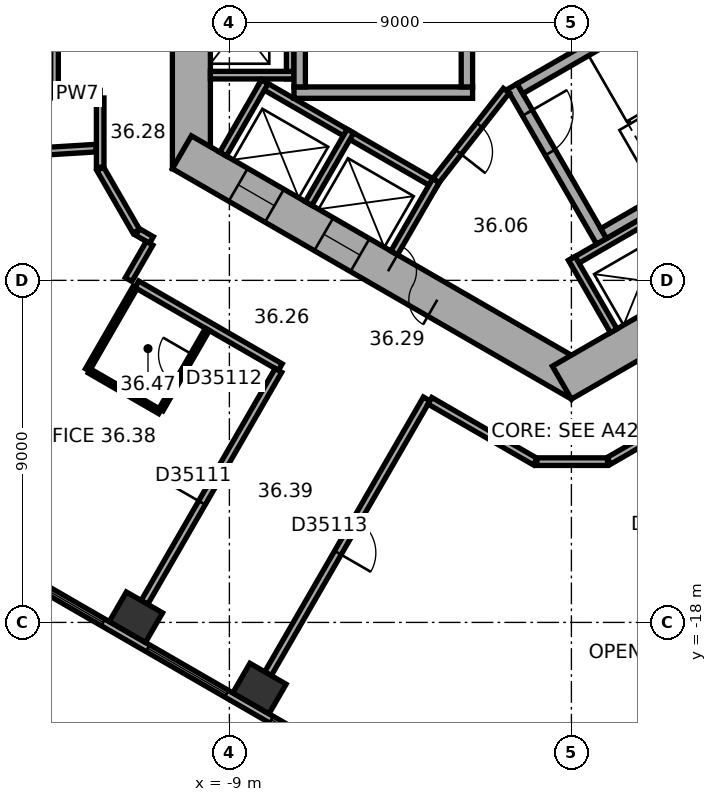
"""IFC4 building model, lengths in metres.
Left out: names, types, materials, properties, quantities, classifications, styles, units other than length and angle.
Written with IfcOpenShell. Run it as: python <this file> out.ifc"""

import sys

from ifc_helpers import new_model, si_unit, direction, frame, frame_2d, origin, origin_2d, place, context, subcontext, project, spatial, rectangle, extrude, element, fill, save


model = new_model("IFC4")
c1 = context("Model", 3, precision=1e-05, world=origin(), true_north=direction((0.0, 1.0)))
c2 = subcontext(c1, "Body", "Model", "MODEL_VIEW")
j1 = project(units=[si_unit("LENGTHUNIT", "METRE"), si_unit("PLANEANGLEUNIT", "RADIAN")], contexts=[c1])
p1 = place(None, origin())
s1 = spatial("IfcSite", under=j1, at=p1, CompositionType="ELEMENT")
p2 = place(p1, origin())
s2 = spatial("IfcBuilding", under=s1, at=p2, CompositionType="ELEMENT")
p3 = place(p2, frame((0.0, 0.0, 150.3)))
s3 = spatial("IfcBuildingStorey", under=s2, at=p3, CompositionType="ELEMENT", Elevation=150.3)
for number, where, z_axis, x_axis in (
    (1, (-11.46, -17.863, 0.0), (0.0, 0.0, 1.0), (0.866, -0.5, 0.0)),
    (2, (-8.208, -19.74, 0.0), (0.0, 0.0, 1.0), (0.866, -0.5, 0.0)),
):
    element("IfcColumn", number, at=place(p3, frame(where, z_axis=z_axis, x_axis=x_axis)), inside=s3, PredefinedType="COLUMN", context=c2, shape_type="SweptSolid", body=[
        extrude(rectangle(XDim=1.1, YDim=0.9, at=origin_2d()), origin(), (0.0, 0.0, 1.0), 3.7),
    ])
p4 = place(p3, frame((-10.0, 6.062, 0.0), z_axis=(0.0, 0.0, 1.0), x_axis=(0.0, -1.0, 0.0)))
e3 = element("IfcWall", 3, at=p4, inside=s3, PredefinedType="SHEAR", context=c2, shape_type="SweptSolid", body=[
    extrude(rectangle(XDim=12.125, YDim=1.0, at=frame_2d((6.062, 0.0))), origin(), (0.0, 0.0, 1.0), 3.7),
])
p5 = place(p4, frame((5.212, 0.0, 0.0)))
e4 = element("IfcOpeningElement", 4, at=p5, cuts=e3, PredefinedType="OPENING", context=c2, shape_type="SweptSolid", body=[
    extrude(rectangle(XDim=1.1, YDim=2.1, at=frame_2d((0.55, 1.05))), frame((0.0, 0.51, 0.0), z_axis=(0.0, -1.0, 0.0), x_axis=(1.0, 0.0, 0.0)), (0.0, 0.0, 1.0), 1.02),
])
p6 = place(p4, frame((7.812, 0.0, 0.0)))
e5 = element("IfcOpeningElement", 5, at=p6, cuts=e3, PredefinedType="OPENING", context=c2, shape_type="SweptSolid", body=[
    extrude(rectangle(XDim=1.1, YDim=2.1, at=frame_2d((0.55, 1.05))), frame((0.0, 0.51, 0.0), z_axis=(0.0, -1.0, 0.0), x_axis=(1.0, 0.0, 0.0)), (0.0, 0.0, 1.0), 1.02),
])
p7 = place(p3, frame((-10.25, -5.629, 0.0), z_axis=(0.0, 0.0, 1.0), x_axis=(0.866022616891, -0.50000482701, 0.0)))
e6 = element("IfcWall", 6, at=p7, inside=s3, PredefinedType="SHEAR", context=c2, shape_type="SweptSolid", body=[
    extrude(rectangle(XDim=12.125, YDim=1.0, at=frame_2d((6.062, 0.0))), origin(), (0.0, 0.0, 1.0), 3.7),
])
p8 = place(p7, frame((6.262, 0.0, 0.0)))
e7 = element("IfcOpeningElement", 7, at=p8, cuts=e6, PredefinedType="OPENING", context=c2, shape_type="SweptSolid", body=[
    extrude(rectangle(XDim=1.5, YDim=2.1, at=frame_2d((0.75, 1.05))), frame((0.0, 0.51, 0.0), z_axis=(0.0, -1.0, 0.0), x_axis=(1.0, 0.0, 0.0)), (0.0, 0.0, 1.0), 1.02),
])
p9 = place(p7, frame((1.712, 0.0, 0.0)))
e8 = element("IfcOpeningElement", 8, at=p9, cuts=e6, PredefinedType="OPENING", context=c2, shape_type="SweptSolid", body=[
    extrude(rectangle(XDim=1.1, YDim=2.1, at=frame_2d((0.55, 1.05))), frame((0.0, 0.51, 0.0), z_axis=(0.0, -1.0, 0.0), x_axis=(1.0, 0.0, 0.0)), (0.0, 0.0, 1.0), 1.02),
])
p10 = place(p7, frame((4.312, 0.0, 0.0)))
e9 = element("IfcOpeningElement", 9, at=p10, cuts=e6, PredefinedType="OPENING", context=c2, shape_type="SweptSolid", body=[
    extrude(rectangle(XDim=1.1, YDim=2.1, at=frame_2d((0.55, 1.05))), frame((0.0, 0.51, 0.0), z_axis=(0.0, -1.0, 0.0), x_axis=(1.0, 0.0, 0.0)), (0.0, 0.0, 1.0), 1.02),
])
p11 = place(p3, frame((-0.25, -11.691, 0.0), z_axis=(0.0, 0.0, 1.0), x_axis=(0.866022616891, 0.50000482701, 0.0)))
e10 = element("IfcWall", 10, at=p11, inside=s3, PredefinedType="SHEAR", context=c2, shape_type="SweptSolid", body=[
    extrude(rectangle(XDim=12.125, YDim=1.0, at=frame_2d((6.062, 0.0))), origin(), (0.0, 0.0, 1.0), 3.7),
])
p12 = place(p11, frame((2.612, 0.0, 0.0)))
e11 = element("IfcOpeningElement", 11, at=p12, cuts=e10, PredefinedType="OPENING", context=c2, shape_type="SweptSolid", body=[
    extrude(rectangle(XDim=1.1, YDim=2.1, at=frame_2d((0.55, 1.05))), frame((0.0, 0.51, 0.0), z_axis=(0.0, -1.0, 0.0), x_axis=(1.0, 0.0, 0.0)), (0.0, 0.0, 1.0), 1.02),
])
p13 = place(p11, frame((5.212, 0.0, 0.0)))
e12 = element("IfcOpeningElement", 12, at=p13, cuts=e10, PredefinedType="OPENING", context=c2, shape_type="SweptSolid", body=[
    extrude(rectangle(XDim=1.1, YDim=2.1, at=frame_2d((0.55, 1.05))), frame((0.0, 0.51, 0.0), z_axis=(0.0, -1.0, 0.0), x_axis=(1.0, 0.0, 0.0)), (0.0, 0.0, 1.0), 1.02),
])
p14 = place(p11, frame((7.812, 0.0, 0.0)))
e13 = element("IfcOpeningElement", 13, at=p14, cuts=e10, PredefinedType="OPENING", context=c2, shape_type="SweptSolid", body=[
    extrude(rectangle(XDim=1.1, YDim=2.1, at=frame_2d((0.55, 1.05))), frame((0.0, 0.51, 0.0), z_axis=(0.0, -1.0, 0.0), x_axis=(1.0, 0.0, 0.0)), (0.0, 0.0, 1.0), 1.02),
])
p15 = place(p3, frame((-18.789, -14.267, 0.0), z_axis=(0.0, 0.0, 1.0), x_axis=(0.866023315909, -0.500003616288, 0.0)))
e14 = element("IfcWall", 14, at=p15, inside=s3, PredefinedType="STANDARD", context=c2, shape_type="SweptSolid", body=[
    extrude(rectangle(XDim=20.044, YDim=0.2, at=frame_2d((10.022, 0.0))), origin(), (0.0, 0.0, 1.0), 3.7),
])
p16 = place(p15, frame((1.314, 0.0, 0.9)))
e15 = element("IfcOpeningElement", 15, at=p16, cuts=e14, PredefinedType="OPENING", context=c2, shape_type="SweptSolid", body=[
    extrude(rectangle(XDim=2.4, YDim=2.0, at=frame_2d((1.2, 1.0))), frame((0.0, 0.11, 0.0), z_axis=(0.0, -1.0, 0.0), x_axis=(1.0, 0.0, 0.0)), (0.0, 0.0, 1.0), 0.22),
])
p17 = place(p15, frame((5.069, 0.0, 0.9)))
e16 = element("IfcOpeningElement", 16, at=p17, cuts=e14, PredefinedType="OPENING", context=c2, shape_type="SweptSolid", body=[
    extrude(rectangle(XDim=2.4, YDim=2.0, at=frame_2d((1.2, 1.0))), frame((0.0, 0.11, 0.0), z_axis=(0.0, -1.0, 0.0), x_axis=(1.0, 0.0, 0.0)), (0.0, 0.0, 1.0), 0.22),
])
p18 = place(p15, frame((8.823, 0.0, 0.9)))
e17 = element("IfcOpeningElement", 17, at=p18, cuts=e14, PredefinedType="OPENING", context=c2, shape_type="SweptSolid", body=[
    extrude(rectangle(XDim=2.4, YDim=2.0, at=frame_2d((1.2, 1.0))), frame((0.0, 0.11, 0.0), z_axis=(0.0, -1.0, 0.0), x_axis=(1.0, 0.0, 0.0)), (0.0, 0.0, 1.0), 0.22),
])
p19 = place(p15, frame((12.577, 0.0, 0.9)))
e18 = element("IfcOpeningElement", 18, at=p19, cuts=e14, PredefinedType="OPENING", context=c2, shape_type="SweptSolid", body=[
    extrude(rectangle(XDim=2.4, YDim=2.0, at=frame_2d((1.2, 1.0))), frame((0.0, 0.11, 0.0), z_axis=(0.0, -1.0, 0.0), x_axis=(1.0, 0.0, 0.0)), (0.0, 0.0, 1.0), 0.22),
])
p20 = place(p15, frame((16.331, 0.0, 0.9)))
e19 = element("IfcOpeningElement", 19, at=p20, cuts=e14, PredefinedType="OPENING", context=c2, shape_type="SweptSolid", body=[
    extrude(rectangle(XDim=2.4, YDim=2.0, at=frame_2d((1.2, 1.0))), frame((0.0, 0.11, 0.0), z_axis=(0.0, -1.0, 0.0), x_axis=(1.0, 0.0, 0.0)), (0.0, 0.0, 1.0), 0.22),
])
p21 = place(p3, frame((-7.4, 4.3, 0.0), z_axis=(0.0, 0.0, 1.0), x_axis=(0.0, -1.0, 0.0)))
e20 = element("IfcWall", 20, at=p21, inside=s3, PredefinedType="PARTITIONING", context=c2, shape_type="SweptSolid", body=[
    extrude(rectangle(XDim=8.0, YDim=0.2, at=frame_2d((4.0, 0.0))), origin(), (0.0, 0.0, 1.0), 3.42),
])
p22 = place(p3, frame((-7.3, -3.6, 0.0), z_axis=(0.0, 0.0, 1.0), x_axis=(-1.0, 0.0, 0.0)))
e21 = element("IfcWall", 21, at=p22, inside=s3, PredefinedType="PARTITIONING", context=c2, shape_type="SweptSolid", body=[
    extrude(rectangle(XDim=2.2, YDim=0.2, at=frame_2d((1.1, 0.0))), origin(), (0.0, 0.0, 1.0), 3.42),
])
p23 = place(p3, frame((-8.203, -3.809, 0.0), z_axis=(0.0, 0.0, 1.0), x_axis=(0.866028230842, -0.499995103361, 0.0)))
e22 = element("IfcWall", 22, at=p23, inside=s3, PredefinedType="PARTITIONING", context=c2, shape_type="SweptSolid", body=[
    extrude(rectangle(XDim=5.4, YDim=0.2, at=frame_2d((2.7, 0.0))), origin(), (0.0, 0.0, 1.0), 3.42),
])
for number, where, z_axis, x_axis in (
    (23, (-8.067, -3.772, 0.0), (0.0, 0.0, 1.0), (-0.5, -0.866, 0.0)),
    (24, (-5.815, -5.072, 0.0), (0.0, 0.0, 1.0), (-0.5, -0.866, 0.0)),
):
    element("IfcWall", number, at=place(p3, frame(where, z_axis=z_axis, x_axis=x_axis)), inside=s3, PredefinedType="PARTITIONING", context=c2, shape_type="SweptSolid", body=[
        extrude(rectangle(XDim=2.2, YDim=0.2, at=frame_2d((1.1, 0.0))), origin(), (0.0, 0.0, 1.0), 3.42),
    ])
p24 = place(p3, frame((-3.563, -6.372, 0.0), z_axis=(0.0, 0.0, 1.0), x_axis=(-0.499994660107, -0.866028486751, 0.0)))
e25 = element("IfcWall", 25, at=p24, inside=s3, PredefinedType="PARTITIONING", context=c2, shape_type="SweptSolid", body=[
    extrude(rectangle(XDim=2.2, YDim=0.2, at=frame_2d((1.1, 0.0))), origin(), (0.0, 0.0, 1.0), 3.42),
])
p25 = place(p3, frame((-0.024, -8.559, 0.0), z_axis=(0.0, 0.0, 1.0), x_axis=(0.866026010844, 0.49999894854, 0.0)))
e26 = element("IfcWall", 26, at=p25, inside=s3, PredefinedType="PARTITIONING", context=c2, shape_type="SweptSolid", body=[
    extrude(rectangle(XDim=8.0, YDim=0.2, at=frame_2d((4.0, 0.0))), origin(), (0.0, 0.0, 1.0), 3.42),
])
p26 = place(p3, frame((0.013, -8.422, 0.0), z_axis=(0.0, 0.0, 1.0), x_axis=(0.500077893725, -0.86598042715, 0.0)))
e27 = element("IfcWall", 27, at=p26, inside=s3, PredefinedType="PARTITIONING", context=c2, shape_type="SweptSolid", body=[
    extrude(rectangle(XDim=2.2, YDim=0.2, at=frame_2d((1.1, 0.0))), origin(), (0.0, 0.0, 1.0), 3.42),
])
p27 = place(p3, frame((-2.6, -4.06, 0.0), z_axis=(0.0, 0.0, 1.0), x_axis=(-1.0, 0.0, 0.0)))
e28 = element("IfcWall", 28, at=p27, inside=s3, PredefinedType="SHEAR", context=c2, shape_type="SweptSolid", body=[
    extrude(rectangle(XDim=4.7, YDim=0.3, at=frame_2d((2.35, 0.0))), origin(), (0.0, 0.0, 1.0), 3.42),
])
for number, where, z_axis, x_axis in (
    (29, (-2.75, 3.15, 0.0), (0.0, 0.0, 1.0), (0.0, -1.0, 0.0)),
    (30, (-7.15, 3.15, 0.0), (0.0, 0.0, 1.0), (0.0, -1.0, 0.0)),
):
    element("IfcWall", number, at=place(p3, frame(where, z_axis=z_axis, x_axis=x_axis)), inside=s3, PredefinedType="SHEAR", context=c2, shape_type="SweptSolid", body=[
        extrude(rectangle(XDim=7.06, YDim=0.3, at=frame_2d((3.53, 0.0))), origin(), (0.0, 0.0, 1.0), 3.42),
    ])
p28 = place(p3, frame((-1.558, -3.902, 0.0), z_axis=(0.0, 0.0, 1.0), x_axis=(0.499977259774, -0.866038532462, 0.0)))
e31 = element("IfcWall", 31, at=p28, inside=s3, PredefinedType="SHEAR", context=c2, shape_type="SweptSolid", body=[
    extrude(rectangle(XDim=4.7, YDim=0.3, at=frame_2d((2.35, 0.0))), origin(), (0.0, 0.0, 1.0), 3.42),
])
p29 = place(p28, frame((0.8, 0.0, 0.0)))
e32 = element("IfcOpeningElement", 32, at=p29, cuts=e31, PredefinedType="OPENING", context=c2, shape_type="SweptSolid", body=[
    extrude(rectangle(XDim=1.2, YDim=2.1, at=frame_2d((0.6, 1.05))), frame((0.0, 0.16, 0.0), z_axis=(0.0, -1.0, 0.0), x_axis=(1.0, 0.0, 0.0)), (0.0, 0.0, 1.0), 0.32),
])
for number, where, z_axis, x_axis in (
    (33, (-1.353, -3.957, 0.0), (0.0, 0.0, 1.0), (0.866, 0.5, 0.0)),
    (34, (0.847, -7.767, 0.0), (0.0, 0.0, 1.0), (0.866, 0.5, 0.0)),
):
    element("IfcWall", number, at=place(p3, frame(where, z_axis=z_axis, x_axis=x_axis)), inside=s3, PredefinedType="SHEAR", context=c2, shape_type="SweptSolid", body=[
        extrude(rectangle(XDim=7.06, YDim=0.3, at=frame_2d((3.53, 0.0))), origin(), (0.0, 0.0, 1.0), 3.42),
    ])
p30 = place(p3, frame((-1.712, -4.008, 0.0), z_axis=(0.0, 0.0, 1.0), x_axis=(-0.616549420702, -0.787316208287, 0.0)))
e35 = element("IfcWall", 35, at=p30, inside=s3, PredefinedType="PARTITIONING", context=c2, shape_type="SweptSolid", body=[
    extrude(rectangle(XDim=3.002, YDim=0.2, at=frame_2d((1.501, 0.0))), origin(), (0.0, 0.0, 1.0), 3.42),
])
p31 = place(p30, frame((1.15, 0.0, 0.0)))
e36 = element("IfcOpeningElement", 36, at=p31, cuts=e35, PredefinedType="OPENING", context=c2, shape_type="SweptSolid", body=[
    extrude(rectangle(XDim=0.9, YDim=2.1, at=frame_2d((0.45, 1.05))), frame((0.0, 0.11, 0.0), z_axis=(0.0, -1.0, 0.0), x_axis=(1.0, 0.0, 0.0)), (0.0, 0.0, 1.0), 0.22),
])
p32 = place(p3, frame((-20.421, -6.005, 0.0), z_axis=(0.0, 0.0, 1.0), x_axis=(0.998134865741, 0.061047438866, 0.0)))
e37 = element("IfcWall", 37, at=p32, inside=s3, PredefinedType="PARTITIONING", context=c2, shape_type="SweptSolid", body=[
    extrude(rectangle(XDim=7.927, YDim=0.2, at=frame_2d((3.963, 0.0))), origin(), (0.0, 0.0, 1.0), 2.87),
])
p33 = place(p3, frame((-13.601, -4.101, 0.0), z_axis=(0.0, 0.0, 1.0), x_axis=(1.0, 0.0, 0.0)))
e38 = element("IfcWall", 38, at=p33, inside=s3, PredefinedType="PARTITIONING", context=c2, shape_type="SweptSolid", body=[
    extrude(rectangle(XDim=1.201, YDim=0.2, at=frame_2d((0.601, 0.0))), origin(), (0.0, 0.0, 1.0), 3.42),
])
p34 = place(p3, frame((-13.601, 2.101, 0.0), z_axis=(0.0, 0.0, 1.0), x_axis=(0.0, -1.0, 0.0)))
e39 = element("IfcWall", 39, at=p34, inside=s3, PredefinedType="PARTITIONING", context=c2, shape_type="SweptSolid", body=[
    extrude(rectangle(XDim=6.102, YDim=0.2, at=frame_2d((3.051, 0.0))), origin(), (0.0, 0.0, 1.0), 3.42),
])
p35 = place(p34, frame((2.551, 0.0, 0.0)))
e40 = element("IfcOpeningElement", 40, at=p35, cuts=e39, PredefinedType="OPENING", context=c2, shape_type="SweptSolid", body=[
    extrude(rectangle(XDim=1.0, YDim=2.1, at=frame_2d((0.5, 1.05))), frame((0.0, 0.11, 0.0), z_axis=(0.0, -1.0, 0.0), x_axis=(1.0, 0.0, 0.0)), (0.0, 0.0, 1.0), 0.22),
])
p36 = place(p3, frame((-12.735, -11.355, 0.0), z_axis=(0.0, 0.0, 1.0), x_axis=(0.500004234368, 0.866022959057, 0.0)))
e41 = element("IfcWall", 41, at=p36, inside=s3, PredefinedType="PARTITIONING", context=c2, shape_type="SweptSolid", body=[
    extrude(rectangle(XDim=2.5, YDim=0.12, at=frame_2d((1.25, 0.0))), origin(), (0.0, 0.0, 1.0), 3.42),
])
p37 = place(p3, frame((-12.4, -6.062, 0.0), z_axis=(0.0, 0.0, 1.0), x_axis=(0.500022797313, -0.86601224135, 0.0)))
e42 = element("IfcWall", 42, at=p37, inside=s3, PredefinedType="PARTITIONING", context=c2, shape_type="SweptSolid", body=[
    extrude(rectangle(XDim=1.9, YDim=0.2, at=frame_2d((0.95, 0.0))), origin(), (0.0, 0.0, 1.0), 3.42),
])
p38 = place(p3, frame((-12.4, -4.201, 0.0), z_axis=(0.0, 0.0, 1.0), x_axis=(0.0, -1.0, 0.0)))
e43 = element("IfcWall", 43, at=p38, inside=s3, PredefinedType="PARTITIONING", context=c2, shape_type="SweptSolid", body=[
    extrude(rectangle(XDim=1.821, YDim=0.2, at=frame_2d((0.911, 0.0))), origin(), (0.0, 0.0, 1.0), 3.42),
])
p39 = place(p3, frame((-11.435, -9.103, 0.0), z_axis=(0.0, 0.0, 1.0), x_axis=(0.866007399799, -0.500031182522, 0.0)))
e44 = element("IfcWall", 44, at=p39, inside=s3, PredefinedType="PARTITIONING", context=c2, shape_type="SweptSolid", body=[
    extrude(rectangle(XDim=4.358, YDim=0.2, at=frame_2d((2.179, 0.0))), origin(), (0.0, 0.0, 1.0), 3.42),
])
p40 = place(p3, frame((-11.415, -7.728, 0.0), z_axis=(0.0, 0.0, 1.0), x_axis=(0.865915281873, -0.500190688257, 0.0)))
e45 = element("IfcWall", 45, at=p40, inside=s3, PredefinedType="PARTITIONING", context=c2, shape_type="SweptSolid", body=[
    extrude(rectangle(XDim=0.421, YDim=0.2, at=frame_2d((0.21, 0.0))), origin(), (0.0, 0.0, 1.0), 3.42),
])
p41 = place(p3, frame((-11.235, -17.474, 0.0), z_axis=(0.0, 0.0, 1.0), x_axis=(0.500009260695, 0.866020057054, 0.0)))
e46 = element("IfcWall", 46, at=p41, inside=s3, PredefinedType="PARTITIONING", context=c2, shape_type="SweptSolid", body=[
    extrude(rectangle(XDim=7.049, YDim=0.2, at=frame_2d((3.524, 0.0))), origin(), (0.0, 0.0, 1.0), 2.87),
])
p42 = place(p41, frame((3.024, 0.0, 0.0)))
e47 = element("IfcOpeningElement", 47, at=p42, cuts=e46, PredefinedType="OPENING", context=c2, shape_type="SweptSolid", body=[
    extrude(rectangle(XDim=1.0, YDim=2.1, at=frame_2d((0.5, 1.05))), frame((0.0, 0.11, 0.0), z_axis=(0.0, -1.0, 0.0), x_axis=(1.0, 0.0, 0.0)), (0.0, 0.0, 1.0), 0.22),
])
p43 = place(p3, frame((-11.101, -8.025, 0.0), z_axis=(0.0, 0.0, 1.0), x_axis=(-0.500074377092, -0.865982457891, 0.0)))
e48 = element("IfcWall", 48, at=p43, inside=s3, PredefinedType="PARTITIONING", context=c2, shape_type="SweptSolid", body=[
    extrude(rectangle(XDim=1.101, YDim=0.2, at=frame_2d((0.55, 0.0))), origin(), (0.0, 0.0, 1.0), 3.42),
])
p44 = place(p3, frame((-10.829, -12.455, 0.0), z_axis=(0.0, 0.0, 1.0), x_axis=(-0.86600889856, 0.500028586798, 0.0)))
e49 = element("IfcWall", 49, at=p44, inside=s3, PredefinedType="PARTITIONING", context=c2, shape_type="SweptSolid", body=[
    extrude(rectangle(XDim=2.14, YDim=0.12, at=frame_2d((1.07, 0.0))), origin(), (0.0, 0.0, 1.0), 3.42),
])
p45 = place(p3, frame((-9.579, -10.29, 0.0), z_axis=(0.0, 0.0, 1.0), x_axis=(-0.499959183527, -0.866048967903, 0.0)))
e50 = element("IfcWall", 50, at=p45, inside=s3, PredefinedType="PARTITIONING", context=c2, shape_type="SweptSolid", body=[
    extrude(rectangle(XDim=2.44, YDim=0.12, at=frame_2d((1.22, 0.0))), origin(), (0.0, 0.0, 1.0), 3.42),
])
p46 = place(p45, frame((0.77, 0.0, 0.0)))
e51 = element("IfcOpeningElement", 51, at=p46, cuts=e50, PredefinedType="OPENING", context=c2, shape_type="SweptSolid", body=[
    extrude(rectangle(XDim=0.9, YDim=2.1, at=frame_2d((0.45, 1.05))), frame((0.0, 0.07, 0.0), z_axis=(0.0, -1.0, 0.0), x_axis=(1.0, 0.0, 0.0)), (0.0, 0.0, 1.0), 0.14),
])
p47 = place(p3, frame((-7.984, -19.351, 0.0), z_axis=(0.0, 0.0, 1.0), x_axis=(0.500010139422, 0.866019549707, 0.0)))
e52 = element("IfcWall", 52, at=p47, inside=s3, PredefinedType="PARTITIONING", context=c2, shape_type="SweptSolid", body=[
    extrude(rectangle(XDim=8.35, YDim=0.2, at=frame_2d((4.175, 0.0))), origin(), (0.0, 0.0, 1.0), 3.42),
])
p48 = place(p47, frame((3.675, 0.0, 0.0)))
e53 = element("IfcOpeningElement", 53, at=p48, cuts=e52, PredefinedType="OPENING", context=c2, shape_type="SweptSolid", body=[
    extrude(rectangle(XDim=1.0, YDim=2.1, at=frame_2d((0.5, 1.05))), frame((0.0, 0.11, 0.0), z_axis=(0.0, -1.0, 0.0), x_axis=(1.0, 0.0, 0.0)), (0.0, 0.0, 1.0), 0.22),
])
p49 = place(p3, frame((-3.722, -12.169, 0.0), z_axis=(0.0, 0.0, 1.0), x_axis=(0.866033163891, -0.499986558861, 0.0)))
e54 = element("IfcWall", 54, at=p49, inside=s3, PredefinedType="PARTITIONING", context=c2, shape_type="SweptSolid", body=[
    extrude(rectangle(XDim=3.201, YDim=0.2, at=frame_2d((1.6, 0.0))), origin(), (0.0, 0.0, 1.0), 3.42),
])
p50 = place(p3, frame((-0.91, -13.77, 0.0), z_axis=(0.0, 0.0, 1.0), x_axis=(1.0, 0.0, 0.0)))
e55 = element("IfcWall", 55, at=p50, inside=s3, PredefinedType="PARTITIONING", context=c2, shape_type="SweptSolid", body=[
    extrude(rectangle(XDim=1.86, YDim=0.2, at=frame_2d((0.93, 0.0))), origin(), (0.0, 0.0, 1.0), 3.42),
])
p51 = place(p3, frame((0.985, -13.75, 0.0), z_axis=(0.0, 0.0, 1.0), x_axis=(0.866028661061, 0.499994358189, 0.0)))
e56 = element("IfcWall", 56, at=p51, inside=s3, PredefinedType="PARTITIONING", context=c2, shape_type="SweptSolid", body=[
    extrude(rectangle(XDim=1.321, YDim=0.2, at=frame_2d((0.661, 0.0))), origin(), (0.0, 0.0, 1.0), 3.42),
])
p52 = place(p17, origin())
e57 = element("IfcWindow", 57, at=p52, inside=s3, PartitioningType="SINGLE_PANEL", PredefinedType="WINDOW", context=c2, shape_type="SweptSolid", body=[
    extrude(rectangle(XDim=2.4, YDim=2.0, at=frame_2d((1.2, 1.0))), frame((0.0, 0.03, 0.0), z_axis=(0.0, -1.0, 0.0), x_axis=(1.0, 0.0, 0.0)), (0.0, 0.0, 1.0), 0.06),
])
fill(e16, e57)
p53 = place(p18, origin())
e58 = element("IfcWindow", 58, at=p53, inside=s3, PartitioningType="SINGLE_PANEL", PredefinedType="WINDOW", context=c2, shape_type="SweptSolid", body=[
    extrude(rectangle(XDim=2.4, YDim=2.0, at=frame_2d((1.2, 1.0))), frame((0.0, 0.03, 0.0), z_axis=(0.0, -1.0, 0.0), x_axis=(1.0, 0.0, 0.0)), (0.0, 0.0, 1.0), 0.06),
])
fill(e17, e58)
p54 = place(p19, origin())
e59 = element("IfcWindow", 59, at=p54, inside=s3, PartitioningType="SINGLE_PANEL", PredefinedType="WINDOW", context=c2, shape_type="SweptSolid", body=[
    extrude(rectangle(XDim=2.4, YDim=2.0, at=frame_2d((1.2, 1.0))), frame((0.0, 0.03, 0.0), z_axis=(0.0, -1.0, 0.0), x_axis=(1.0, 0.0, 0.0)), (0.0, 0.0, 1.0), 0.06),
])
fill(e18, e59)
p55 = place(p8, origin())
e60 = element("IfcDoor", 60, at=p55, inside=s3, OperationType="DOUBLE_DOOR_SINGLE_SWING", PredefinedType="DOOR", context=c2, shape_type="SweptSolid", body=[
    extrude(rectangle(XDim=1.5, YDim=2.1, at=frame_2d((0.75, 1.05))), frame((0.0, 0.025, 0.0), z_axis=(0.0, -1.0, 0.0), x_axis=(1.0, 0.0, 0.0)), (0.0, 0.0, 1.0), 0.05),
])
fill(e7, e60)
p56 = place(p29, origin())
e61 = element("IfcDoor", 61, at=p56, inside=s3, OperationType="SINGLE_SWING_RIGHT", PredefinedType="DOOR", context=c2, shape_type="SweptSolid", body=[
    extrude(rectangle(XDim=1.2, YDim=2.1, at=frame_2d((0.6, 1.05))), frame((0.0, 0.025, 0.0), z_axis=(0.0, -1.0, 0.0), x_axis=(1.0, 0.0, 0.0)), (0.0, 0.0, 1.0), 0.05),
])
fill(e32, e61)
p57 = place(p31, origin())
e62 = element("IfcDoor", 62, at=p57, inside=s3, OperationType="SINGLE_SWING_LEFT", PredefinedType="DOOR", context=c2, shape_type="SweptSolid", body=[
    extrude(rectangle(XDim=0.9, YDim=2.1, at=frame_2d((0.45, 1.05))), frame((0.0, 0.025, 0.0), z_axis=(0.0, -1.0, 0.0), x_axis=(1.0, 0.0, 0.0)), (0.0, 0.0, 1.0), 0.05),
])
fill(e36, e62)
p58 = place(p9, origin())
e63 = element("IfcDoor", 63, at=p58, inside=s3, OperationType="DOUBLE_DOOR_SLIDING", PredefinedType="DOOR", context=c2, shape_type="SweptSolid", body=[
    extrude(rectangle(XDim=1.1, YDim=2.1, at=frame_2d((0.55, 1.05))), frame((0.0, 0.025, 0.0), z_axis=(0.0, -1.0, 0.0), x_axis=(1.0, 0.0, 0.0)), (0.0, 0.0, 1.0), 0.05),
])
fill(e8, e63)
p59 = place(p10, origin())
e64 = element("IfcDoor", 64, at=p59, inside=s3, OperationType="DOUBLE_DOOR_SLIDING", PredefinedType="DOOR", context=c2, shape_type="SweptSolid", body=[
    extrude(rectangle(XDim=1.1, YDim=2.1, at=frame_2d((0.55, 1.05))), frame((0.0, 0.025, 0.0), z_axis=(0.0, -1.0, 0.0), x_axis=(1.0, 0.0, 0.0)), (0.0, 0.0, 1.0), 0.05),
])
fill(e9, e64)
p60 = place(p42, origin())
e65 = element("IfcDoor", 65, at=p60, inside=s3, OperationType="SINGLE_SWING_LEFT", PredefinedType="DOOR", context=c2, shape_type="SweptSolid", body=[
    extrude(rectangle(XDim=1.0, YDim=2.1, at=frame_2d((0.5, 1.05))), frame((0.0, 0.025, 0.0), z_axis=(0.0, -1.0, 0.0), x_axis=(1.0, 0.0, 0.0)), (0.0, 0.0, 1.0), 0.05),
])
fill(e47, e65)
p61 = place(p46, origin())
e66 = element("IfcDoor", 66, at=p61, inside=s3, OperationType="SINGLE_SWING_LEFT", PredefinedType="DOOR", context=c2, shape_type="SweptSolid", body=[
    extrude(rectangle(XDim=0.9, YDim=2.1, at=frame_2d((0.45, 1.05))), frame((0.0, 0.025, 0.0), z_axis=(0.0, -1.0, 0.0), x_axis=(1.0, 0.0, 0.0)), (0.0, 0.0, 1.0), 0.05),
])
fill(e51, e66)
p62 = place(p48, origin())
e67 = element("IfcDoor", 67, at=p62, inside=s3, OperationType="SINGLE_SWING_LEFT", PredefinedType="DOOR", context=c2, shape_type="SweptSolid", body=[
    extrude(rectangle(XDim=1.0, YDim=2.1, at=frame_2d((0.5, 1.05))), frame((0.0, 0.025, 0.0), z_axis=(0.0, -1.0, 0.0), x_axis=(1.0, 0.0, 0.0)), (0.0, 0.0, 1.0), 0.05),
])
fill(e53, e67)
save(model, sys.argv[1])
